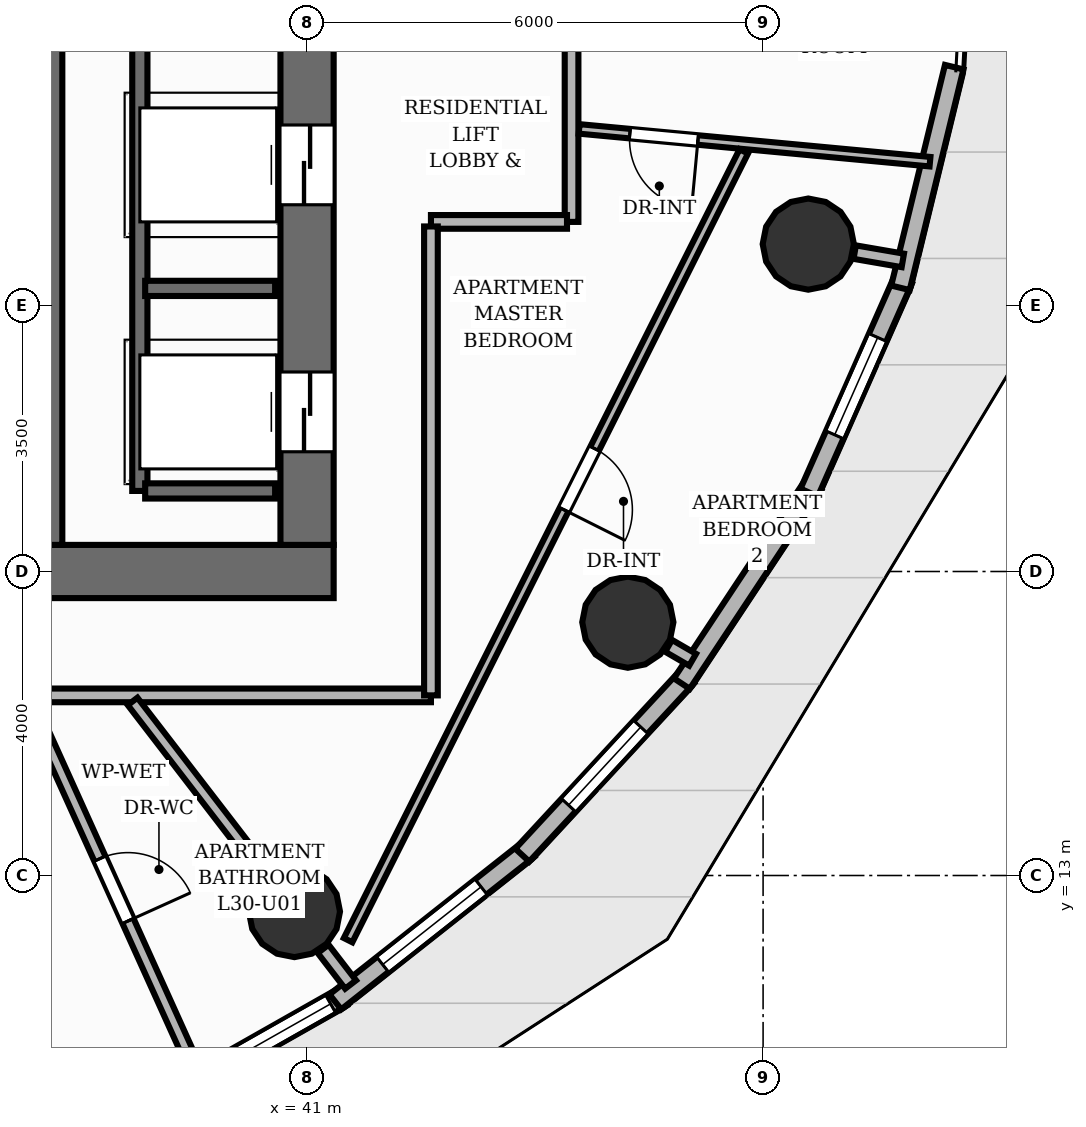
"""IFC4 building model, lengths in metres.
Left out: names, types, materials, properties, quantities, classifications, styles, units other than length and angle.
Written with IfcOpenShell. Run it as: python <this file> out.ifc"""

import sys

from ifc_helpers import new_model, si_unit, direction, frame, frame_2d, origin, origin_2d, place, context, subcontext, project, spatial, rectangle, circle, extrude, element, fill, save


model = new_model("IFC4")
c1 = context("Model", 3, precision=1e-05, world=origin(), true_north=direction((0.0, 1.0)))
c2 = subcontext(c1, "Body", "Model", "MODEL_VIEW")
j1 = project(units=[si_unit("LENGTHUNIT", "METRE"), si_unit("PLANEANGLEUNIT", "RADIAN")], contexts=[c1])
p1 = place(None, origin())
s1 = spatial("IfcSite", under=j1, at=p1, CompositionType="ELEMENT")
p2 = place(p1, origin())
s2 = spatial("IfcBuilding", under=s1, at=p2, CompositionType="ELEMENT")
p3 = place(p2, frame((0.0, 0.0, 102.88)))
s3 = spatial("IfcBuildingStorey", under=s2, at=p3, CompositionType="ELEMENT", Elevation=102.88)
p4 = place(p3, frame((22.65, 17.0, 0.0), z_axis=(0.0, 0.0, 1.0), x_axis=(1.0, 0.0, 0.0)))
e1 = element("IfcWall", 1, at=p4, inside=s3, PredefinedType="SHEAR", context=c2, shape_type="SweptSolid", body=[
    extrude(rectangle(XDim=18.7, YDim=0.7, at=frame_2d((9.35, 0.0))), origin(), (0.0, 0.0, 1.0), 3.2),
])
p5 = place(p4, frame((5.85, 0.0, 0.0)))
e2 = element("IfcOpeningElement", 2, at=p5, cuts=e1, PredefinedType="OPENING", context=c2, shape_type="SweptSolid", body=[
    extrude(rectangle(XDim=1.1, YDim=2.15, at=frame_2d((0.55, 1.075))), frame((0.0, 0.36, 0.0), z_axis=(0.0, -1.0, 0.0), x_axis=(1.0, 0.0, 0.0)), (0.0, 0.0, 1.0), 0.72),
])
p6 = place(p4, frame((9.4, 0.0, 0.0)))
e3 = element("IfcOpeningElement", 3, at=p6, cuts=e1, PredefinedType="OPENING", context=c2, shape_type="SweptSolid", body=[
    extrude(rectangle(XDim=0.9, YDim=2.1, at=frame_2d((0.45, 1.05))), frame((0.0, 0.36, 0.0), z_axis=(0.0, -1.0, 0.0), x_axis=(1.0, 0.0, 0.0)), (0.0, 0.0, 1.0), 0.72),
])
p7 = place(p3, frame((41.0, 17.35, 0.0), z_axis=(0.0, 0.0, 1.0), x_axis=(0.0, 1.0, 0.0)))
e4 = element("IfcWall", 4, at=p7, inside=s3, PredefinedType="SHEAR", context=c2, shape_type="SweptSolid", body=[
    extrude(rectangle(XDim=13.3, YDim=0.7, at=frame_2d((6.65, 0.0))), origin(), (0.0, 0.0, 1.0), 3.2),
])
p8 = place(p7, frame((1.225, 0.0, 0.0)))
e5 = element("IfcOpeningElement", 5, at=p8, cuts=e4, PredefinedType="OPENING", context=c2, shape_type="SweptSolid", body=[
    extrude(rectangle(XDim=1.05, YDim=2.15, at=frame_2d((0.525, 1.075))), frame((0.0, 0.36, 0.0), z_axis=(0.0, -1.0, 0.0), x_axis=(1.0, 0.0, 0.0)), (0.0, 0.0, 1.0), 0.72),
])
p9 = place(p7, frame((4.475, 0.0, 0.0)))
e6 = element("IfcOpeningElement", 6, at=p9, cuts=e4, PredefinedType="OPENING", context=c2, shape_type="SweptSolid", body=[
    extrude(rectangle(XDim=1.05, YDim=2.15, at=frame_2d((0.525, 1.075))), frame((0.0, 0.36, 0.0), z_axis=(0.0, -1.0, 0.0), x_axis=(1.0, 0.0, 0.0)), (0.0, 0.0, 1.0), 0.72),
])
p10 = place(p7, frame((7.775, 0.0, 0.0)))
e7 = element("IfcOpeningElement", 7, at=p10, cuts=e4, PredefinedType="OPENING", context=c2, shape_type="SweptSolid", body=[
    extrude(rectangle(XDim=1.05, YDim=2.15, at=frame_2d((0.525, 1.075))), frame((0.0, 0.36, 0.0), z_axis=(0.0, -1.0, 0.0), x_axis=(1.0, 0.0, 0.0)), (0.0, 0.0, 1.0), 0.72),
])
p11 = place(p7, frame((11.025, 0.0, 0.0)))
e8 = element("IfcOpeningElement", 8, at=p11, cuts=e4, PredefinedType="OPENING", context=c2, shape_type="SweptSolid", body=[
    extrude(rectangle(XDim=1.05, YDim=2.15, at=frame_2d((0.525, 1.075))), frame((0.0, 0.36, 0.0), z_axis=(0.0, -1.0, 0.0), x_axis=(1.0, 0.0, 0.0)), (0.0, 0.0, 1.0), 0.72),
])
p12 = place(p3, frame((37.5, 17.35, 0.0), z_axis=(0.0, 0.0, 1.0), x_axis=(0.0, 1.0, 0.0)))
e9 = element("IfcWall", 9, at=p12, inside=s3, PredefinedType="SHEAR", context=c2, shape_type="SweptSolid", body=[
    extrude(rectangle(XDim=13.3, YDim=0.56, at=frame_2d((6.65, 0.0))), origin(), (0.0, 0.0, 1.0), 3.2),
])
for number, where, z_axis, x_axis in (
    (10, (40.833, 12.526, 0.0), (0.0, 0.0, 1.0), (1.0, 0.0, 0.0)),
    (11, (45.22, 16.333, 0.0), (0.0, 0.0, 1.0), (1.0, 0.0, 0.0)),
    (12, (47.594, 21.308, 0.0), (0.0, 0.0, 1.0), (1.0, 0.0, 0.0)),
):
    element("IfcColumn", number, at=place(p3, frame(where, z_axis=z_axis, x_axis=x_axis)), inside=s3, PredefinedType="COLUMN", context=c2, shape_type="SweptSolid", body=[
        extrude(circle(Radius=0.6, at=origin_2d()), origin(), (0.0, 0.0, 1.0), 3.2),
    ])
p13 = place(p3, frame((41.462, 11.397, 0.0), z_axis=(0.0, 0.0, 1.0), x_axis=(-0.869984700924, -0.493078715986, 0.0)))
e13 = element("IfcWall", 13, at=p13, inside=s3, PredefinedType="SOLIDWALL", context=c2, shape_type="SweptSolid", body=[
    extrude(rectangle(XDim=3.26, YDim=0.25, at=frame_2d((1.63, 0.0))), origin(), (0.0, 0.0, 1.0), 2.96),
])
p14 = place(p13, frame((0.175, 0.0, 0.85)))
e14 = element("IfcOpeningElement", 14, at=p14, cuts=e13, PredefinedType="OPENING", context=c2, shape_type="SweptSolid", body=[
    extrude(rectangle(XDim=1.65, YDim=1.55, at=frame_2d((0.825, 0.775))), frame((0.0, 0.135, 0.0), z_axis=(0.0, -1.0, 0.0), x_axis=(1.0, 0.0, 0.0)), (0.0, 0.0, 1.0), 0.27),
])
p15 = place(p3, frame((43.912, 13.342, 0.0), z_axis=(0.0, 0.0, 1.0), x_axis=(-0.784871179145, -0.619658964389, 0.0)))
e15 = element("IfcWall", 15, at=p15, inside=s3, PredefinedType="SOLIDWALL", context=c2, shape_type="SweptSolid", body=[
    extrude(rectangle(XDim=3.236, YDim=0.25, at=frame_2d((1.618, 0.0))), origin(), (0.0, 0.0, 1.0), 2.96),
])
p16 = place(p15, frame((0.793, 0.0, 0.85)))
e16 = element("IfcOpeningElement", 16, at=p16, cuts=e15, PredefinedType="OPENING", context=c2, shape_type="SweptSolid", body=[
    extrude(rectangle(XDim=1.65, YDim=1.55, at=frame_2d((0.825, 0.775))), frame((0.0, 0.135, 0.0), z_axis=(0.0, -1.0, 0.0), x_axis=(1.0, 0.0, 0.0)), (0.0, 0.0, 1.0), 0.27),
])
p17 = place(p3, frame((45.999, 15.612, 0.0), z_axis=(0.0, 0.0, 1.0), x_axis=(-0.678956449941, -0.734178547142, 0.0)))
e17 = element("IfcWall", 17, at=p17, inside=s3, PredefinedType="SOLIDWALL", context=c2, shape_type="SweptSolid", body=[
    extrude(rectangle(XDim=3.192, YDim=0.25, at=frame_2d((1.596, 0.0))), origin(), (0.0, 0.0, 1.0), 2.96),
])
p18 = place(p17, frame((0.896, 0.0, 0.85)))
e18 = element("IfcOpeningElement", 18, at=p18, cuts=e17, PredefinedType="OPENING", context=c2, shape_type="SweptSolid", body=[
    extrude(rectangle(XDim=1.4, YDim=1.55, at=frame_2d((0.7, 0.775))), frame((0.0, 0.135, 0.0), z_axis=(0.0, -1.0, 0.0), x_axis=(1.0, 0.0, 0.0)), (0.0, 0.0, 1.0), 0.27),
])
p19 = place(p3, frame((47.659, 18.136, 0.0), z_axis=(0.0, 0.0, 1.0), x_axis=(-0.552034347266, -0.833821371421, 0.0)))
e19 = element("IfcWall", 19, at=p19, inside=s3, PredefinedType="SOLIDWALL", context=c2, shape_type="SweptSolid", body=[
    extrude(rectangle(XDim=3.131, YDim=0.25, at=frame_2d((1.565, 0.0))), origin(), (0.0, 0.0, 1.0), 2.96),
])
p20 = place(p3, frame((48.843, 20.838, 0.0), z_axis=(0.0, 0.0, 1.0), x_axis=(-0.404109525311, -0.914710605357, 0.0)))
e20 = element("IfcWall", 20, at=p20, inside=s3, PredefinedType="SOLIDWALL", context=c2, shape_type="SweptSolid", body=[
    extrude(rectangle(XDim=3.061, YDim=0.25, at=frame_2d((1.53, 0.0))), origin(), (0.0, 0.0, 1.0), 2.96),
])
p21 = place(p20, frame((0.83, 0.0, 0.85)))
e21 = element("IfcOpeningElement", 21, at=p21, cuts=e20, PredefinedType="OPENING", context=c2, shape_type="SweptSolid", body=[
    extrude(rectangle(XDim=1.4, YDim=1.55, at=frame_2d((0.7, 0.775))), frame((0.0, 0.135, 0.0), z_axis=(0.0, -1.0, 0.0), x_axis=(1.0, 0.0, 0.0)), (0.0, 0.0, 1.0), 0.27),
])
p22 = place(p3, frame((49.514, 23.636, 0.0), z_axis=(0.0, 0.0, 1.0), x_axis=(-0.236668427837, -0.971590477138, 0.0)))
e22 = element("IfcWall", 22, at=p22, inside=s3, PredefinedType="SOLIDWALL", context=c2, shape_type="SweptSolid", body=[
    extrude(rectangle(XDim=2.989, YDim=0.25, at=frame_2d((1.494, 0.0))), origin(), (0.0, 0.0, 1.0), 2.96),
])
p23 = place(p3, frame((38.8, 18.06, 0.0), z_axis=(0.0, 0.0, 1.0), x_axis=(0.0, 1.0, 0.0)))
e23 = element("IfcWall", 23, at=p23, inside=s3, PredefinedType="SHEAR", context=c2, shape_type="SweptSolid", body=[
    extrude(rectangle(XDim=11.88, YDim=0.2, at=frame_2d((5.94, 0.0))), origin(), (0.0, 0.0, 1.0), 3.2),
])
for number, where, z_axis, x_axis in (
    (24, (38.87, 18.06, 0.0), (0.0, 0.0, 1.0), (1.0, 0.0, 0.0)),
    (25, (38.87, 20.725, 0.0), (0.0, 0.0, 1.0), (1.0, 0.0, 0.0)),
):
    element("IfcWall", number, at=place(p3, frame(where, z_axis=z_axis, x_axis=x_axis)), inside=s3, PredefinedType="SHEAR", context=c2, shape_type="SweptSolid", body=[
        extrude(rectangle(XDim=1.71, YDim=0.2, at=frame_2d((0.855, 0.0))), origin(), (0.0, 0.0, 1.0), 3.2),
    ])
p24 = place(p3, frame((41.212, 12.034, 0.0), z_axis=(0.0, 0.0, 1.0), x_axis=(0.609790512648, -0.792562635181, 0.0)))
e26 = element("IfcWall", 26, at=p24, inside=s3, PredefinedType="PARTITIONING", context=c2, shape_type="SweptSolid", body=[
    extrude(rectangle(XDim=0.592, YDim=0.18, at=frame_2d((0.296, 0.0))), origin(), (0.0, 0.0, 1.0), 2.261),
])
p25 = place(p3, frame((45.757, 16.022, 0.0), z_axis=(0.0, 0.0, 1.0), x_axis=(0.864891917132, -0.501958137377, 0.0)))
e27 = element("IfcWall", 27, at=p25, inside=s3, PredefinedType="PARTITIONING", context=c2, shape_type="SweptSolid", body=[
    extrude(rectangle(XDim=0.365, YDim=0.18, at=frame_2d((0.183, 0.0))), origin(), (0.0, 0.0, 1.0), 2.261),
])
p26 = place(p3, frame((48.206, 21.202, 0.0), z_axis=(0.0, 0.0, 1.0), x_axis=(0.985389793052, -0.170314285219, 0.0)))
e28 = element("IfcWall", 28, at=p26, inside=s3, PredefinedType="PARTITIONING", context=c2, shape_type="SweptSolid", body=[
    extrude(rectangle(XDim=0.642, YDim=0.18, at=frame_2d((0.321, 0.0))), origin(), (0.0, 0.0, 1.0), 2.261),
])
p27 = place(p3, frame((42.63, 15.37, 0.0), z_axis=(0.0, 0.0, 1.0), x_axis=(-1.0, 0.0, 0.0)))
e29 = element("IfcWall", 29, at=p27, inside=s3, PredefinedType="PARTITIONING", context=c2, shape_type="SweptSolid", body=[
    extrude(rectangle(XDim=14.346, YDim=0.18, at=frame_2d((7.173, 0.0))), origin(), (0.0, 0.0, 1.0), 2.955),
])
p28 = place(p27, frame((6.615, 0.0, 0.0)))
e30 = element("IfcOpeningElement", 30, at=p28, cuts=e29, PredefinedType="OPENING", context=c2, shape_type="SweptSolid", body=[
    extrude(rectangle(XDim=1.05, YDim=2.15, at=frame_2d((0.525, 1.075))), frame((0.0, 0.1, 0.0), z_axis=(0.0, -1.0, 0.0), x_axis=(1.0, 0.0, 0.0)), (0.0, 0.0, 1.0), 0.2),
])
p29 = place(p3, frame((44.48, 26.34, 0.0), z_axis=(0.0, 0.0, 1.0), x_axis=(0.0, -1.0, 0.0)))
e31 = element("IfcWall", 31, at=p29, inside=s3, PredefinedType="PARTITIONING", context=c2, shape_type="SweptSolid", body=[
    extrude(rectangle(XDim=4.74, YDim=0.18, at=frame_2d((2.37, 0.0))), origin(), (0.0, 0.0, 1.0), 2.955),
])
p30 = place(p29, frame((1.239, 0.0, 0.0)))
e32 = element("IfcOpeningElement", 32, at=p30, cuts=e31, PredefinedType="OPENING", context=c2, shape_type="SweptSolid", body=[
    extrude(rectangle(XDim=1.05, YDim=2.15, at=frame_2d((0.525, 1.075))), frame((0.0, 0.1, 0.0), z_axis=(0.0, -1.0, 0.0), x_axis=(1.0, 0.0, 0.0)), (0.0, 0.0, 1.0), 0.2),
])
p31 = place(p3, frame((44.42, 21.6, 0.0), z_axis=(0.0, 0.0, 1.0), x_axis=(-1.0, 0.0, 0.0)))
e33 = element("IfcWall", 33, at=p31, inside=s3, PredefinedType="PARTITIONING", context=c2, shape_type="SweptSolid", body=[
    extrude(rectangle(XDim=1.79, YDim=0.18, at=frame_2d((0.895, 0.0))), origin(), (0.0, 0.0, 1.0), 2.261),
])
p32 = place(p3, frame((42.63, 21.54, 0.0), z_axis=(0.0, 0.0, 1.0), x_axis=(0.0, -1.0, 0.0)))
e34 = element("IfcWall", 34, at=p32, inside=s3, PredefinedType="PARTITIONING", context=c2, shape_type="SweptSolid", body=[
    extrude(rectangle(XDim=6.17, YDim=0.18, at=frame_2d((3.085, 0.0))), origin(), (0.0, 0.0, 1.0), 2.955),
])
p33 = place(p3, frame((37.345, 15.279, 0.0), z_axis=(0.0, 0.0, 1.0), x_axis=(0.411532357021, -0.911395149825, 0.0)))
e35 = element("IfcWall", 35, at=p33, inside=s3, PredefinedType="PLUMBINGWALL", context=c2, shape_type="SweptSolid", body=[
    extrude(rectangle(XDim=5.415, YDim=0.16, at=frame_2d((2.707, 0.0))), origin(), (0.0, 0.0, 1.0), 2.642),
])
p34 = place(p33, frame((2.257, 0.0, 0.0)))
e36 = element("IfcOpeningElement", 36, at=p34, cuts=e35, PredefinedType="OPENING", context=c2, shape_type="SweptSolid", body=[
    extrude(rectangle(XDim=0.9, YDim=2.1, at=frame_2d((0.45, 1.05))), frame((0.0, 0.09, 0.0), z_axis=(0.0, -1.0, 0.0), x_axis=(1.0, 0.0, 0.0)), (0.0, 0.0, 1.0), 0.18),
])
p35 = place(p3, frame((38.705, 15.291, 0.0), z_axis=(0.0, 0.0, 1.0), x_axis=(0.610033601295, -0.792375545617, 0.0)))
e37 = element("IfcWall", 37, at=p35, inside=s3, PredefinedType="PLUMBINGWALL", context=c2, shape_type="SweptSolid", body=[
    extrude(rectangle(XDim=2.887, YDim=0.16, at=frame_2d((1.443, 0.0))), origin(), (0.0, 0.0, 1.0), 2.261),
])
p36 = place(p3, frame((49.196, 22.392, 0.0), z_axis=(0.0, 0.0, 1.0), x_axis=(-0.99565683003, 0.09309928472, 0.0)))
e38 = element("IfcWall", 38, at=p36, inside=s3, PredefinedType="PARTITIONING", context=c2, shape_type="SweptSolid", body=[
    extrude(rectangle(XDim=4.636, YDim=0.125, at=frame_2d((2.318, 0.0))), origin(), (0.0, 0.0, 1.0), 2.955),
])
p37 = place(p36, frame((3.066, 0.0, 0.0)))
e39 = element("IfcOpeningElement", 39, at=p37, cuts=e38, PredefinedType="OPENING", context=c2, shape_type="SweptSolid", body=[
    extrude(rectangle(XDim=0.9, YDim=2.1, at=frame_2d((0.45, 1.05))), frame((0.0, 0.073, 0.0), z_axis=(0.0, -1.0, 0.0), x_axis=(1.0, 0.0, 0.0)), (0.0, 0.0, 1.0), 0.145),
])
p38 = place(p3, frame((46.746, 22.528, 0.0), z_axis=(0.0, 0.0, 1.0), x_axis=(-0.448357094434, -0.893854527242, 0.0)))
e40 = element("IfcWall", 40, at=p38, inside=s3, PredefinedType="PARTITIONING", context=c2, shape_type="SweptSolid", body=[
    extrude(rectangle(XDim=11.611, YDim=0.125, at=frame_2d((5.805, 0.0))), origin(), (0.0, 0.0, 1.0), 2.404),
])
p39 = place(p38, frame((4.375, 0.0, 0.0)))
e41 = element("IfcOpeningElement", 41, at=p39, cuts=e40, PredefinedType="OPENING", context=c2, shape_type="SweptSolid", body=[
    extrude(rectangle(XDim=0.9, YDim=2.1, at=frame_2d((0.45, 1.05))), frame((0.0, 0.073, 0.0), z_axis=(0.0, -1.0, 0.0), x_axis=(1.0, 0.0, 0.0)), (0.0, 0.0, 1.0), 0.145),
])
p40 = place(p14, origin())
e42 = element("IfcWindow", 42, at=p40, inside=s3, PartitioningType="SINGLE_PANEL", PredefinedType="WINDOW", context=c2, shape_type="SweptSolid", body=[
    extrude(rectangle(XDim=1.65, YDim=1.55, at=frame_2d((0.825, 0.775))), frame((0.0, 0.03, 0.0), z_axis=(0.0, -1.0, 0.0), x_axis=(1.0, 0.0, 0.0)), (0.0, 0.0, 1.0), 0.06),
])
fill(e14, e42)
p41 = place(p16, origin())
e43 = element("IfcWindow", 43, at=p41, inside=s3, PartitioningType="SINGLE_PANEL", PredefinedType="WINDOW", context=c2, shape_type="SweptSolid", body=[
    extrude(rectangle(XDim=1.65, YDim=1.55, at=frame_2d((0.825, 0.775))), frame((0.0, 0.03, 0.0), z_axis=(0.0, -1.0, 0.0), x_axis=(1.0, 0.0, 0.0)), (0.0, 0.0, 1.0), 0.06),
])
fill(e16, e43)
p42 = place(p18, origin())
e44 = element("IfcWindow", 44, at=p42, inside=s3, PartitioningType="SINGLE_PANEL", PredefinedType="WINDOW", context=c2, shape_type="SweptSolid", body=[
    extrude(rectangle(XDim=1.4, YDim=1.55, at=frame_2d((0.7, 0.775))), frame((0.0, 0.03, 0.0), z_axis=(0.0, -1.0, 0.0), x_axis=(1.0, 0.0, 0.0)), (0.0, 0.0, 1.0), 0.06),
])
fill(e18, e44)
p43 = place(p21, origin())
e45 = element("IfcWindow", 45, at=p43, inside=s3, PartitioningType="SINGLE_PANEL", PredefinedType="WINDOW", context=c2, shape_type="SweptSolid", body=[
    extrude(rectangle(XDim=1.4, YDim=1.55, at=frame_2d((0.7, 0.775))), frame((0.0, 0.03, 0.0), z_axis=(0.0, -1.0, 0.0), x_axis=(1.0, 0.0, 0.0)), (0.0, 0.0, 1.0), 0.06),
])
fill(e21, e45)
p44 = place(p8, origin())
e46 = element("IfcDoor", 46, at=p44, inside=s3, OperationType="DOUBLE_DOOR_SLIDING", PredefinedType="DOOR", context=c2, shape_type="SweptSolid", body=[
    extrude(rectangle(XDim=1.05, YDim=2.15, at=frame_2d((0.525, 1.075))), frame((0.0, 0.025, 0.0), z_axis=(0.0, -1.0, 0.0), x_axis=(1.0, 0.0, 0.0)), (0.0, 0.0, 1.0), 0.05),
])
fill(e5, e46)
p45 = place(p9, origin())
e47 = element("IfcDoor", 47, at=p45, inside=s3, OperationType="DOUBLE_DOOR_SLIDING", PredefinedType="DOOR", context=c2, shape_type="SweptSolid", body=[
    extrude(rectangle(XDim=1.05, YDim=2.15, at=frame_2d((0.525, 1.075))), frame((0.0, 0.025, 0.0), z_axis=(0.0, -1.0, 0.0), x_axis=(1.0, 0.0, 0.0)), (0.0, 0.0, 1.0), 0.05),
])
fill(e6, e47)
p46 = place(p34, origin())
e48 = element("IfcDoor", 48, at=p46, inside=s3, OperationType="SINGLE_SWING_RIGHT", PredefinedType="DOOR", context=c2, shape_type="SweptSolid", body=[
    extrude(rectangle(XDim=0.9, YDim=2.1, at=frame_2d((0.45, 1.05))), frame((0.0, 0.025, 0.0), z_axis=(0.0, -1.0, 0.0), x_axis=(1.0, 0.0, 0.0)), (0.0, 0.0, 1.0), 0.05),
])
fill(e36, e48)
p47 = place(p37, origin())
e49 = element("IfcDoor", 49, at=p47, inside=s3, OperationType="SINGLE_SWING_LEFT", PredefinedType="DOOR", context=c2, shape_type="SweptSolid", body=[
    extrude(rectangle(XDim=0.9, YDim=2.1, at=frame_2d((0.45, 1.05))), frame((0.0, 0.025, 0.0), z_axis=(0.0, -1.0, 0.0), x_axis=(1.0, 0.0, 0.0)), (0.0, 0.0, 1.0), 0.05),
])
fill(e39, e49)
p48 = place(p39, origin())
e50 = element("IfcDoor", 50, at=p48, inside=s3, OperationType="SINGLE_SWING_RIGHT", PredefinedType="DOOR", context=c2, shape_type="SweptSolid", body=[
    extrude(rectangle(XDim=0.9, YDim=2.1, at=frame_2d((0.45, 1.05))), frame((0.0, 0.025, 0.0), z_axis=(0.0, -1.0, 0.0), x_axis=(1.0, 0.0, 0.0)), (0.0, 0.0, 1.0), 0.05),
])
fill(e41, e50)
save(model, sys.argv[1])
